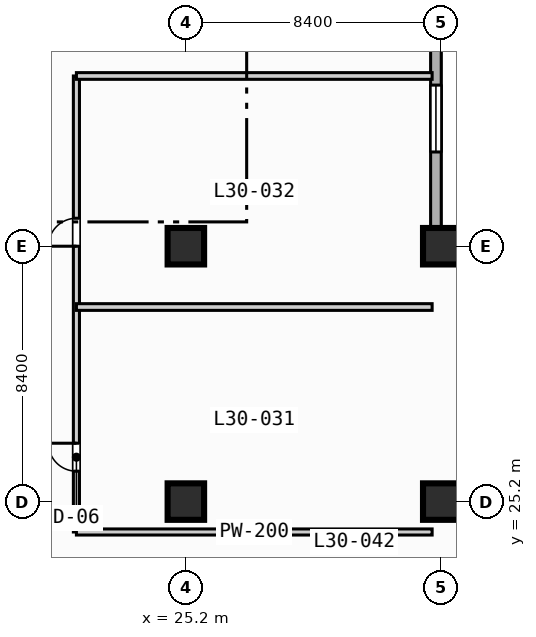
"""IFC4 building model, lengths in metres.
Left out: names, types, materials, properties, quantities, classifications, styles, units other than length and angle.
Written with IfcOpenShell. Run it as: python <this file> out.ifc"""

import sys

from ifc_helpers import new_model, si_unit, direction, frame, frame_2d, origin, origin_2d, place, context, subcontext, project, spatial, rectangle, extrude, element, fill, save


model = new_model("IFC4")
c1 = context("Model", 3, precision=1e-05, world=origin(), true_north=direction((0.0, 1.0)))
c2 = subcontext(c1, "Body", "Model", "MODEL_VIEW")
j1 = project(units=[si_unit("LENGTHUNIT", "METRE"), si_unit("PLANEANGLEUNIT", "RADIAN")], contexts=[c1])
p1 = place(None, origin())
s1 = spatial("IfcSite", under=j1, at=p1, CompositionType="ELEMENT")
p2 = place(p1, origin())
s2 = spatial("IfcBuilding", under=s1, at=p2, CompositionType="ELEMENT")
p3 = place(p2, frame((0.0, 0.0, 126.6)))
s3 = spatial("IfcBuildingStorey", under=s2, at=p3, CompositionType="ELEMENT", Elevation=126.6)
for number, where, z_axis, x_axis in (
    (1, (25.2, 25.2, 0.0), (0.0, 0.0, 1.0), (1.0, 0.0, 0.0)),
    (2, (25.2, 33.6, 0.0), (0.0, 0.0, 1.0), (1.0, 0.0, 0.0)),
    (3, (33.6, 25.2, 0.0), (0.0, 0.0, 1.0), (1.0, 0.0, 0.0)),
    (4, (33.6, 33.6, 0.0), (0.0, 0.0, 1.0), (1.0, 0.0, 0.0)),
):
    element("IfcColumn", number, at=place(p3, frame(where, z_axis=z_axis, x_axis=x_axis)), inside=s3, PredefinedType="COLUMN", context=c2, shape_type="SweptSolid", body=[
        extrude(rectangle(XDim=1.2, YDim=1.2, at=origin_2d()), origin(), (0.0, 0.0, 1.0), 3.8),
    ])
p4 = place(p3, frame((33.425, 89.225, 0.0), z_axis=(0.0, 0.0, 1.0), x_axis=(0.0, -1.0, 0.0)))
e5 = element("IfcWall", 5, at=p4, inside=s3, PredefinedType="STANDARD", context=c2, shape_type="SweptSolid", body=[
    extrude(rectangle(XDim=55.8, YDim=0.35, at=frame_2d((27.9, 0.0))), origin(), (0.0, 0.0, 1.0), 3.55),
])
p5 = place(p4, frame((50.325, 0.0, 0.85)))
e6 = element("IfcOpeningElement", 6, at=p5, cuts=e5, PredefinedType="OPENING", context=c2, shape_type="SweptSolid", body=[
    extrude(rectangle(XDim=2.2, YDim=1.8, at=frame_2d((1.1, 0.9))), frame((0.0, 0.185, 0.0), z_axis=(0.0, -1.0, 0.0), x_axis=(1.0, 0.0, 0.0)), (0.0, 0.0, 1.0), 0.37),
])
p6 = place(p4, frame((33.525, 0.0, 0.85)))
e7 = element("IfcOpeningElement", 7, at=p6, cuts=e5, PredefinedType="OPENING", context=c2, shape_type="SweptSolid", body=[
    extrude(rectangle(XDim=2.2, YDim=1.8, at=frame_2d((1.1, 0.9))), frame((0.0, 0.185, 0.0), z_axis=(0.0, -1.0, 0.0), x_axis=(1.0, 0.0, 0.0)), (0.0, 0.0, 1.0), 0.37),
])
p7 = place(p4, frame((25.125, 0.0, 0.85)))
e8 = element("IfcOpeningElement", 8, at=p7, cuts=e5, PredefinedType="OPENING", context=c2, shape_type="SweptSolid", body=[
    extrude(rectangle(XDim=2.2, YDim=1.8, at=frame_2d((1.1, 0.9))), frame((0.0, 0.185, 0.0), z_axis=(0.0, -1.0, 0.0), x_axis=(1.0, 0.0, 0.0)), (0.0, 0.0, 1.0), 0.37),
])
p8 = place(p4, frame((16.725, 0.0, 0.85)))
e9 = element("IfcOpeningElement", 9, at=p8, cuts=e5, PredefinedType="OPENING", context=c2, shape_type="SweptSolid", body=[
    extrude(rectangle(XDim=2.2, YDim=1.8, at=frame_2d((1.1, 0.9))), frame((0.0, 0.185, 0.0), z_axis=(0.0, -1.0, 0.0), x_axis=(1.0, 0.0, 0.0)), (0.0, 0.0, 1.0), 0.37),
])
p9 = place(p4, frame((8.325, 0.0, 0.85)))
e10 = element("IfcOpeningElement", 10, at=p9, cuts=e5, PredefinedType="OPENING", context=c2, shape_type="SweptSolid", body=[
    extrude(rectangle(XDim=2.2, YDim=1.8, at=frame_2d((1.1, 0.9))), frame((0.0, 0.185, 0.0), z_axis=(0.0, -1.0, 0.0), x_axis=(1.0, 0.0, 0.0)), (0.0, 0.0, 1.0), 0.37),
])
p10 = place(p3, frame((33.425, 33.425, 0.0), z_axis=(0.0, 0.0, 1.0), x_axis=(1.0, 0.0, 0.0)))
e11 = element("IfcWall", 11, at=p10, inside=s3, PredefinedType="STANDARD", context=c2, shape_type="SweptSolid", body=[
    extrude(rectangle(XDim=39.0, YDim=0.35, at=frame_2d((19.5, 0.0))), origin(), (0.0, 0.0, 1.0), 3.55),
])
p11 = place(p10, frame((12.075, 0.0, 0.0)))
e12 = element("IfcOpeningElement", 12, at=p11, cuts=e11, PredefinedType="OPENING", context=c2, shape_type="SweptSolid", body=[
    extrude(rectangle(XDim=1.4, YDim=2.2, at=frame_2d((0.7, 1.1))), frame((0.0, 0.185, 0.0), z_axis=(0.0, -1.0, 0.0), x_axis=(1.0, 0.0, 0.0)), (0.0, 0.0, 1.0), 0.37),
])
p12 = place(p3, frame((21.6, 24.2, 0.0), z_axis=(0.0, 0.0, 1.0), x_axis=(0.0, 1.0, 0.0)))
e13 = element("IfcWall", 13, at=p12, inside=s3, PredefinedType="PARTITIONING", context=c2, shape_type="SweptSolid", body=[
    extrude(rectangle(XDim=15.0, YDim=0.2, at=frame_2d((7.5, 0.0))), origin(), (0.0, 0.0, 1.0), 3.55),
])
p13 = place(p12, frame((2.0, 0.0, 0.0)))
e14 = element("IfcOpeningElement", 14, at=p13, cuts=e13, PredefinedType="OPENING", context=c2, shape_type="SweptSolid", body=[
    extrude(rectangle(XDim=0.92, YDim=2.1, at=frame_2d((0.46, 1.05))), frame((0.0, 0.11, 0.0), z_axis=(0.0, -1.0, 0.0), x_axis=(1.0, 0.0, 0.0)), (0.0, 0.0, 1.0), 0.22),
])
p14 = place(p12, frame((9.4, 0.0, 0.0)))
e15 = element("IfcOpeningElement", 15, at=p14, cuts=e13, PredefinedType="OPENING", context=c2, shape_type="SweptSolid", body=[
    extrude(rectangle(XDim=0.92, YDim=2.1, at=frame_2d((0.46, 1.05))), frame((0.0, 0.11, 0.0), z_axis=(0.0, -1.0, 0.0), x_axis=(1.0, 0.0, 0.0)), (0.0, 0.0, 1.0), 0.22),
])
p15 = place(p3, frame((21.6, 24.2, 0.0), z_axis=(0.0, 0.0, 1.0), x_axis=(1.0, 0.0, 0.0)))
e16 = element("IfcWall", 16, at=p15, inside=s3, PredefinedType="PARTITIONING", context=c2, shape_type="SweptSolid", body=[
    extrude(rectangle(XDim=11.7, YDim=0.2, at=frame_2d((5.85, 0.0))), origin(), (0.0, 0.0, 1.0), 3.55),
])
for number, where, z_axis, x_axis in (
    (17, (21.6, 31.6, 0.0), (0.0, 0.0, 1.0), (1.0, 0.0, 0.0)),
    (18, (21.6, 39.2, 0.0), (0.0, 0.0, 1.0), (1.0, 0.0, 0.0)),
):
    element("IfcWall", number, at=place(p3, frame(where, z_axis=z_axis, x_axis=x_axis)), inside=s3, PredefinedType="PARTITIONING", context=c2, shape_type="SweptSolid", body=[
        extrude(rectangle(XDim=11.7, YDim=0.22, at=frame_2d((5.85, 0.0))), origin(), (0.0, 0.0, 1.0), 3.55),
    ])
p16 = place(p5, origin())
e19 = element("IfcWindow", 19, at=p16, inside=s3, PartitioningType="SINGLE_PANEL", PredefinedType="WINDOW", context=c2, shape_type="SweptSolid", body=[
    extrude(rectangle(XDim=2.2, YDim=1.8, at=frame_2d((1.1, 0.9))), frame((0.0, 0.03, 0.0), z_axis=(0.0, -1.0, 0.0), x_axis=(1.0, 0.0, 0.0)), (0.0, 0.0, 1.0), 0.06),
])
fill(e6, e19)
p17 = place(p13, origin())
e20 = element("IfcDoor", 20, at=p17, inside=s3, OperationType="SINGLE_SWING_RIGHT", PredefinedType="DOOR", context=c2, shape_type="SweptSolid", body=[
    extrude(rectangle(XDim=0.92, YDim=2.1, at=frame_2d((0.46, 1.05))), frame((0.0, 0.025, 0.0), z_axis=(0.0, -1.0, 0.0), x_axis=(1.0, 0.0, 0.0)), (0.0, 0.0, 1.0), 0.05),
])
fill(e14, e20)
p18 = place(p14, origin())
e21 = element("IfcDoor", 21, at=p18, inside=s3, OperationType="SINGLE_SWING_LEFT", PredefinedType="DOOR", context=c2, shape_type="SweptSolid", body=[
    extrude(rectangle(XDim=0.92, YDim=2.1, at=frame_2d((0.46, 1.05))), frame((0.0, 0.025, 0.0), z_axis=(0.0, -1.0, 0.0), x_axis=(1.0, 0.0, 0.0)), (0.0, 0.0, 1.0), 0.05),
])
fill(e15, e21)
save(model, sys.argv[1])
